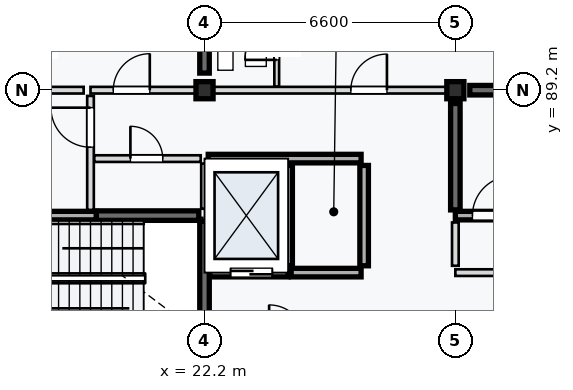
"""IFC4 building model, lengths in metres.
Left out: names, types, materials, properties, quantities, classifications, styles, units other than length and angle.
Written with IfcOpenShell. Run it as: python <this file> out.ifc"""

import sys

from ifc_helpers import new_model, si_unit, direction, frame, frame_2d, origin, origin_2d, place, context, subcontext, project, spatial, rectangle, extrude, element, fill, save


model = new_model("IFC4")
c1 = context("Model", 3, precision=1e-05, world=origin(), true_north=direction((0.0, 1.0)))
c2 = subcontext(c1, "Body", "Model", "MODEL_VIEW")
j1 = project(units=[si_unit("LENGTHUNIT", "METRE"), si_unit("PLANEANGLEUNIT", "RADIAN")], contexts=[c1])
p1 = place(None, origin())
s1 = spatial("IfcSite", under=j1, at=p1, CompositionType="ELEMENT")
p2 = place(p1, origin())
s2 = spatial("IfcBuilding", under=s1, at=p2, CompositionType="ELEMENT")
p3 = place(p2, frame((0.0, 0.0, 40.4)))
s3 = spatial("IfcBuildingStorey", under=s2, at=p3, CompositionType="ELEMENT", Elevation=40.4)
for number, where, z_axis, x_axis in (
    (1, (22.2, 89.2, 0.0), (0.0, 0.0, 1.0), (1.0, 0.0, 0.0)),
    (2, (28.8, 89.2, 0.0), (0.0, 0.0, 1.0), (1.0, 0.0, 0.0)),
):
    element("IfcColumn", number, at=place(p3, frame(where, z_axis=z_axis, x_axis=x_axis)), inside=s3, PredefinedType="COLUMN", context=c2, shape_type="SweptSolid", body=[
        extrude(rectangle(XDim=0.45, YDim=0.45, at=origin_2d()), origin(), (0.0, 0.0, 1.0), 3.2),
    ])
p4 = place(p3, frame((19.35, 85.9, 0.0), z_axis=(0.0, 0.0, 1.0), x_axis=(1.0, 0.0, 0.0)))
e3 = element("IfcWall", 3, at=p4, inside=s3, PredefinedType="SHEAR", context=c2, shape_type="SweptSolid", body=[
    extrude(rectangle(XDim=2.7, YDim=0.25, at=frame_2d((1.35, 0.0))), origin(), (0.0, 0.0, 1.0), 2.98),
])
p5 = place(p3, frame((22.2, 82.95, 0.0), z_axis=(0.0, 0.0, 1.0), x_axis=(0.0, 1.0, 0.0)))
e4 = element("IfcWall", 4, at=p5, inside=s3, PredefinedType="SHEAR", context=c2, shape_type="SweptSolid", body=[
    extrude(rectangle(XDim=2.8, YDim=0.25, at=frame_2d((1.4, 0.0))), origin(), (0.0, 0.0, 1.0), 2.98),
])
p6 = place(p3, frame((29.18, 89.2, 0.0), z_axis=(0.0, 0.0, 1.0), x_axis=(1.0, 0.0, 0.0)))
e5 = element("IfcWall", 5, at=p6, inside=s3, PredefinedType="SHEAR", context=c2, shape_type="SweptSolid", body=[
    extrude(rectangle(XDim=5.84, YDim=0.25, at=frame_2d((2.92, 0.0))), origin(), (0.0, 0.0, 1.0), 2.98),
])
p7 = place(p3, frame((28.8, 86.05, 0.0), z_axis=(0.0, 0.0, 1.0), x_axis=(0.0, 1.0, 0.0)))
e6 = element("IfcWall", 6, at=p7, inside=s3, PredefinedType="SHEAR", context=c2, shape_type="SweptSolid", body=[
    extrude(rectangle(XDim=2.8, YDim=0.25, at=frame_2d((1.4, 0.0))), origin(), (0.0, 0.0, 1.0), 2.98),
])
p8 = place(p3, frame((22.2, 89.65, 0.0), z_axis=(0.0, 0.0, 1.0), x_axis=(0.0, 1.0, 0.0)))
e7 = element("IfcWall", 7, at=p8, inside=s3, PredefinedType="SHEAR", context=c2, shape_type="SweptSolid", body=[
    extrude(rectangle(XDim=5.7, YDim=0.25, at=frame_2d((2.85, 0.0))), origin(), (0.0, 0.0, 1.0), 2.98),
])
p9 = place(p3, frame((15.75, 85.9, 0.0), z_axis=(0.0, 0.0, 1.0), x_axis=(1.0, 0.0, 0.0)))
e8 = element("IfcWall", 8, at=p9, inside=s3, PredefinedType="STANDARD", context=c2, shape_type="SweptSolid", body=[
    extrude(rectangle(XDim=3.6, YDim=0.225, at=frame_2d((1.8, 0.0))), origin(), (0.0, 0.0, 1.0), 2.98),
])
p10 = place(p9, frame((0.45, 0.0, 0.0)))
e9 = element("IfcOpeningElement", 9, at=p10, cuts=e8, PredefinedType="OPENING", context=c2, shape_type="SweptSolid", body=[
    extrude(rectangle(XDim=1.0, YDim=2.16, at=frame_2d((0.5, 1.08))), frame((0.0, 0.123, 0.0), z_axis=(0.0, -1.0, 0.0), x_axis=(1.0, 0.0, 0.0)), (0.0, 0.0, 1.0), 0.245),
])
p11 = place(p3, frame((19.2, 86.05, 0.0), z_axis=(0.0, 0.0, 1.0), x_axis=(0.0, 1.0, 0.0)))
e10 = element("IfcWall", 10, at=p11, inside=s3, PredefinedType="PARTITIONING", context=c2, shape_type="SweptSolid", body=[
    extrude(rectangle(XDim=3.0, YDim=0.175, at=frame_2d((1.5, 0.0))), origin(), (0.0, 0.0, 1.0), 2.98),
])
p12 = place(p11, frame((1.65, 0.0, 0.0)))
e11 = element("IfcOpeningElement", 11, at=p12, cuts=e10, PredefinedType="OPENING", context=c2, shape_type="SweptSolid", body=[
    extrude(rectangle(XDim=1.04, YDim=2.12, at=frame_2d((0.52, 1.06))), frame((0.0, 0.097, 0.0), z_axis=(0.0, -1.0, 0.0), x_axis=(1.0, 0.0, 0.0)), (0.0, 0.0, 1.0), 0.195),
])
p13 = place(p3, frame((19.3, 87.4, 0.0), z_axis=(0.0, 0.0, 1.0), x_axis=(1.0, 0.0, 0.0)))
e12 = element("IfcWall", 12, at=p13, inside=s3, PredefinedType="PARTITIONING", context=c2, shape_type="SweptSolid", body=[
    extrude(rectangle(XDim=2.8, YDim=0.175, at=frame_2d((1.4, 0.0))), origin(), (0.0, 0.0, 1.0), 2.98),
])
p14 = place(p13, frame((0.95, 0.0, 0.0)))
e13 = element("IfcOpeningElement", 13, at=p14, cuts=e12, PredefinedType="OPENING", context=c2, shape_type="SweptSolid", body=[
    extrude(rectangle(XDim=0.85, YDim=2.0, at=frame_2d((0.425, 1.0))), frame((0.0, 0.097, 0.0), z_axis=(0.0, -1.0, 0.0), x_axis=(1.0, 0.0, 0.0)), (0.0, 0.0, 1.0), 0.195),
])
p15 = place(p3, frame((22.2, 86.08, 0.0), z_axis=(0.0, 0.0, 1.0), x_axis=(0.0, 1.0, 0.0)))
e14 = element("IfcWall", 14, at=p15, inside=s3, PredefinedType="PARTITIONING", context=c2, shape_type="SweptSolid", body=[
    extrude(rectangle(XDim=1.19, YDim=0.175, at=frame_2d((0.595, 0.0))), origin(), (0.0, 0.0, 1.0), 2.98),
])
p16 = place(p3, frame((22.335, 84.4, 0.0), z_axis=(0.0, 0.0, 1.0), x_axis=(1.0, 0.0, 0.0)))
e15 = element("IfcWall", 15, at=p16, inside=s3, PredefinedType="STANDARD", context=c2, shape_type="SweptSolid", body=[
    extrude(rectangle(XDim=2.065, YDim=0.225, at=frame_2d((1.032, 0.0))), origin(), (0.0, 0.0, 1.0), 2.98),
])
p17 = place(p16, frame((0.55, 0.0, 0.0)))
e16 = element("IfcOpeningElement", 16, at=p17, cuts=e15, PredefinedType="OPENING", context=c2, shape_type="SweptSolid", body=[
    extrude(rectangle(XDim=1.1, YDim=2.1, at=frame_2d((0.55, 1.05))), frame((0.0, 0.123, 0.0), z_axis=(0.0, -1.0, 0.0), x_axis=(1.0, 0.0, 0.0)), (0.0, 0.0, 1.0), 0.245),
])
p18 = place(p3, frame((24.48, 84.4, 0.0), z_axis=(0.0, 0.0, 1.0), x_axis=(1.0, 0.0, 0.0)))
e17 = element("IfcWall", 17, at=p18, inside=s3, PredefinedType="STANDARD", context=c2, shape_type="SweptSolid", body=[
    extrude(rectangle(XDim=1.84, YDim=0.225, at=frame_2d((0.92, 0.0))), origin(), (0.0, 0.0, 1.0), 2.98),
])
p19 = place(p3, frame((22.298, 87.4, 0.0), z_axis=(0.0, 0.0, 1.0), x_axis=(1.0, 0.0, 0.0)))
e18 = element("IfcWall", 18, at=p19, inside=s3, PredefinedType="STANDARD", context=c2, shape_type="SweptSolid", body=[
    extrude(rectangle(XDim=4.022, YDim=0.225, at=frame_2d((2.011, 0.0))), origin(), (0.0, 0.0, 1.0), 2.98),
])
for number, where, z_axis, x_axis in (
    (19, (24.4, 84.58, 0.0), (0.0, 0.0, 1.0), (0.0, 1.0, 0.0)),
    (20, (26.4, 84.58, 0.0), (0.0, 0.0, 1.0), (0.0, 1.0, 0.0)),
):
    element("IfcWall", number, at=place(p3, frame(where, z_axis=z_axis, x_axis=x_axis)), inside=s3, PredefinedType="STANDARD", context=c2, shape_type="SweptSolid", body=[
        extrude(rectangle(XDim=2.64, YDim=0.225, at=frame_2d((1.32, 0.0))), origin(), (0.0, 0.0, 1.0), 2.98),
    ])
p20 = place(p3, frame((28.8, 85.9, 0.0), z_axis=(0.0, 0.0, 1.0), x_axis=(1.0, 0.0, 0.0)))
e21 = element("IfcWall", 21, at=p20, inside=s3, PredefinedType="STANDARD", context=c2, shape_type="SweptSolid", body=[
    extrude(rectangle(XDim=3.45, YDim=0.225, at=frame_2d((1.725, 0.0))), origin(), (0.0, 0.0, 1.0), 2.98),
])
p21 = place(p20, frame((0.45, 0.0, 0.0)))
e22 = element("IfcOpeningElement", 22, at=p21, cuts=e21, PredefinedType="OPENING", context=c2, shape_type="SweptSolid", body=[
    extrude(rectangle(XDim=1.04, YDim=2.12, at=frame_2d((0.52, 1.06))), frame((0.0, 0.123, 0.0), z_axis=(0.0, -1.0, 0.0), x_axis=(1.0, 0.0, 0.0)), (0.0, 0.0, 1.0), 0.245),
])
p22 = place(p3, frame((28.8, 84.4, 0.0), z_axis=(0.0, 0.0, 1.0), x_axis=(1.0, 0.0, 0.0)))
e23 = element("IfcWall", 23, at=p22, inside=s3, PredefinedType="PARTITIONING", context=c2, shape_type="SweptSolid", body=[
    extrude(rectangle(XDim=3.3, YDim=0.175, at=frame_2d((1.65, 0.0))), origin(), (0.0, 0.0, 1.0), 2.98),
])
p23 = place(p22, frame((1.8, 0.0, 0.0)))
e24 = element("IfcOpeningElement", 24, at=p23, cuts=e23, PredefinedType="OPENING", context=c2, shape_type="SweptSolid", body=[
    extrude(rectangle(XDim=1.0, YDim=2.1, at=frame_2d((0.5, 1.05))), frame((0.0, 0.097, 0.0), z_axis=(0.0, -1.0, 0.0), x_axis=(1.0, 0.0, 0.0)), (0.0, 0.0, 1.0), 0.195),
])
p24 = place(p3, frame((28.8, 84.58, 0.0), z_axis=(0.0, 0.0, 1.0), x_axis=(0.0, 1.0, 0.0)))
e25 = element("IfcWall", 25, at=p24, inside=s3, PredefinedType="PARTITIONING", context=c2, shape_type="SweptSolid", body=[
    extrude(rectangle(XDim=1.14, YDim=0.175, at=frame_2d((0.57, 0.0))), origin(), (0.0, 0.0, 1.0), 2.98),
])
p25 = place(p3, frame((15.88, 89.2, 0.0), z_axis=(0.0, 0.0, 1.0), x_axis=(1.0, 0.0, 0.0)))
e26 = element("IfcWall", 26, at=p25, inside=s3, PredefinedType="PARTITIONING", context=c2, shape_type="SweptSolid", body=[
    extrude(rectangle(XDim=3.14, YDim=0.175, at=frame_2d((1.57, 0.0))), origin(), (0.0, 0.0, 1.0), 2.55),
])
p26 = place(p3, frame((19.2, 89.2, 0.0), z_axis=(0.0, 0.0, 1.0), x_axis=(1.0, 0.0, 0.0)))
e27 = element("IfcWall", 27, at=p26, inside=s3, PredefinedType="PARTITIONING", context=c2, shape_type="SweptSolid", body=[
    extrude(rectangle(XDim=3.0, YDim=0.175, at=frame_2d((1.5, 0.0))), origin(), (0.0, 0.0, 1.0), 2.55),
])
p27 = place(p26, frame((0.6, 0.0, 0.0)))
e28 = element("IfcOpeningElement", 28, at=p27, cuts=e27, PredefinedType="OPENING", context=c2, shape_type="SweptSolid", body=[
    extrude(rectangle(XDim=0.96, YDim=2.18, at=frame_2d((0.48, 1.09))), frame((0.0, 0.097, 0.0), z_axis=(0.0, -1.0, 0.0), x_axis=(1.0, 0.0, 0.0)), (0.0, 0.0, 1.0), 0.195),
])
p28 = place(p3, frame((22.2, 89.2, 0.0), z_axis=(0.0, 0.0, 1.0), x_axis=(1.0, 0.0, 0.0)))
e29 = element("IfcWall", 29, at=p28, inside=s3, PredefinedType="PARTITIONING", context=c2, shape_type="SweptSolid", body=[
    extrude(rectangle(XDim=6.6, YDim=0.175, at=frame_2d((3.3, 0.0))), origin(), (0.0, 0.0, 1.0), 2.55),
])
p29 = place(p28, frame((3.85, 0.0, 0.0)))
e30 = element("IfcOpeningElement", 30, at=p29, cuts=e29, PredefinedType="OPENING", context=c2, shape_type="SweptSolid", body=[
    extrude(rectangle(XDim=0.95, YDim=2.16, at=frame_2d((0.475, 1.08))), frame((0.0, 0.097, 0.0), z_axis=(0.0, -1.0, 0.0), x_axis=(1.0, 0.0, 0.0)), (0.0, 0.0, 1.0), 0.195),
])
p30 = place(p3, frame((24.1, 89.298, 0.0), z_axis=(0.0, 0.0, 1.0), x_axis=(0.0, 1.0, 0.0)))
e31 = element("IfcWall", 31, at=p30, inside=s3, PredefinedType="PARTITIONING", context=c2, shape_type="SweptSolid", body=[
    extrude(rectangle(XDim=2.302, YDim=0.125, at=frame_2d((1.151, 0.0))), origin(), (0.0, 0.0, 1.0), 2.98),
])
p31 = place(p30, frame((0.7, 0.0, 0.0)))
e32 = element("IfcOpeningElement", 32, at=p31, cuts=e31, PredefinedType="OPENING", context=c2, shape_type="SweptSolid", body=[
    extrude(rectangle(XDim=0.84, YDim=2.06, at=frame_2d((0.42, 1.03))), frame((0.0, 0.073, 0.0), z_axis=(0.0, -1.0, 0.0), x_axis=(1.0, 0.0, 0.0)), (0.0, 0.0, 1.0), 0.145),
])
p32 = place(p12, origin())
e33 = element("IfcDoor", 33, at=p32, inside=s3, OperationType="SINGLE_SWING_RIGHT", PredefinedType="DOOR", context=c2, shape_type="SweptSolid", body=[
    extrude(rectangle(XDim=1.04, YDim=2.12, at=frame_2d((0.52, 1.06))), frame((0.0, 0.025, 0.0), z_axis=(0.0, -1.0, 0.0), x_axis=(1.0, 0.0, 0.0)), (0.0, 0.0, 1.0), 0.05),
])
fill(e11, e33)
p33 = place(p14, origin())
e34 = element("IfcDoor", 34, at=p33, inside=s3, OperationType="SINGLE_SWING_LEFT", PredefinedType="DOOR", context=c2, shape_type="SweptSolid", body=[
    extrude(rectangle(XDim=0.85, YDim=2.0, at=frame_2d((0.425, 1.0))), frame((0.0, 0.025, 0.0), z_axis=(0.0, -1.0, 0.0), x_axis=(1.0, 0.0, 0.0)), (0.0, 0.0, 1.0), 0.05),
])
fill(e13, e34)
p34 = place(p17, origin())
e35 = element("IfcDoor", 35, at=p34, inside=s3, OperationType="DOUBLE_DOOR_SLIDING", PredefinedType="DOOR", context=c2, shape_type="SweptSolid", body=[
    extrude(rectangle(XDim=1.1, YDim=2.1, at=frame_2d((0.55, 1.05))), frame((0.0, 0.025, 0.0), z_axis=(0.0, -1.0, 0.0), x_axis=(1.0, 0.0, 0.0)), (0.0, 0.0, 1.0), 0.05),
])
fill(e16, e35)
p35 = place(p21, origin())
e36 = element("IfcDoor", 36, at=p35, inside=s3, OperationType="SINGLE_SWING_RIGHT", PredefinedType="DOOR", context=c2, shape_type="SweptSolid", body=[
    extrude(rectangle(XDim=1.04, YDim=2.12, at=frame_2d((0.52, 1.06))), frame((0.0, 0.025, 0.0), z_axis=(0.0, -1.0, 0.0), x_axis=(1.0, 0.0, 0.0)), (0.0, 0.0, 1.0), 0.05),
])
fill(e22, e36)
p36 = place(p27, origin())
e37 = element("IfcDoor", 37, at=p36, inside=s3, OperationType="SINGLE_SWING_RIGHT", PredefinedType="DOOR", context=c2, shape_type="SweptSolid", body=[
    extrude(rectangle(XDim=0.96, YDim=2.18, at=frame_2d((0.48, 1.09))), frame((0.0, 0.025, 0.0), z_axis=(0.0, -1.0, 0.0), x_axis=(1.0, 0.0, 0.0)), (0.0, 0.0, 1.0), 0.05),
])
fill(e28, e37)
p37 = place(p29, origin())
e38 = element("IfcDoor", 38, at=p37, inside=s3, OperationType="SINGLE_SWING_RIGHT", PredefinedType="DOOR", context=c2, shape_type="SweptSolid", body=[
    extrude(rectangle(XDim=0.95, YDim=2.16, at=frame_2d((0.475, 1.08))), frame((0.0, 0.025, 0.0), z_axis=(0.0, -1.0, 0.0), x_axis=(1.0, 0.0, 0.0)), (0.0, 0.0, 1.0), 0.05),
])
fill(e30, e38)
p38 = place(p31, origin())
e39 = element("IfcDoor", 39, at=p38, inside=s3, OperationType="SINGLE_SWING_LEFT", PredefinedType="DOOR", context=c2, shape_type="SweptSolid", body=[
    extrude(rectangle(XDim=0.84, YDim=2.06, at=frame_2d((0.42, 1.03))), frame((0.0, 0.025, 0.0), z_axis=(0.0, -1.0, 0.0), x_axis=(1.0, 0.0, 0.0)), (0.0, 0.0, 1.0), 0.05),
])
fill(e32, e39)
save(model, sys.argv[1])
